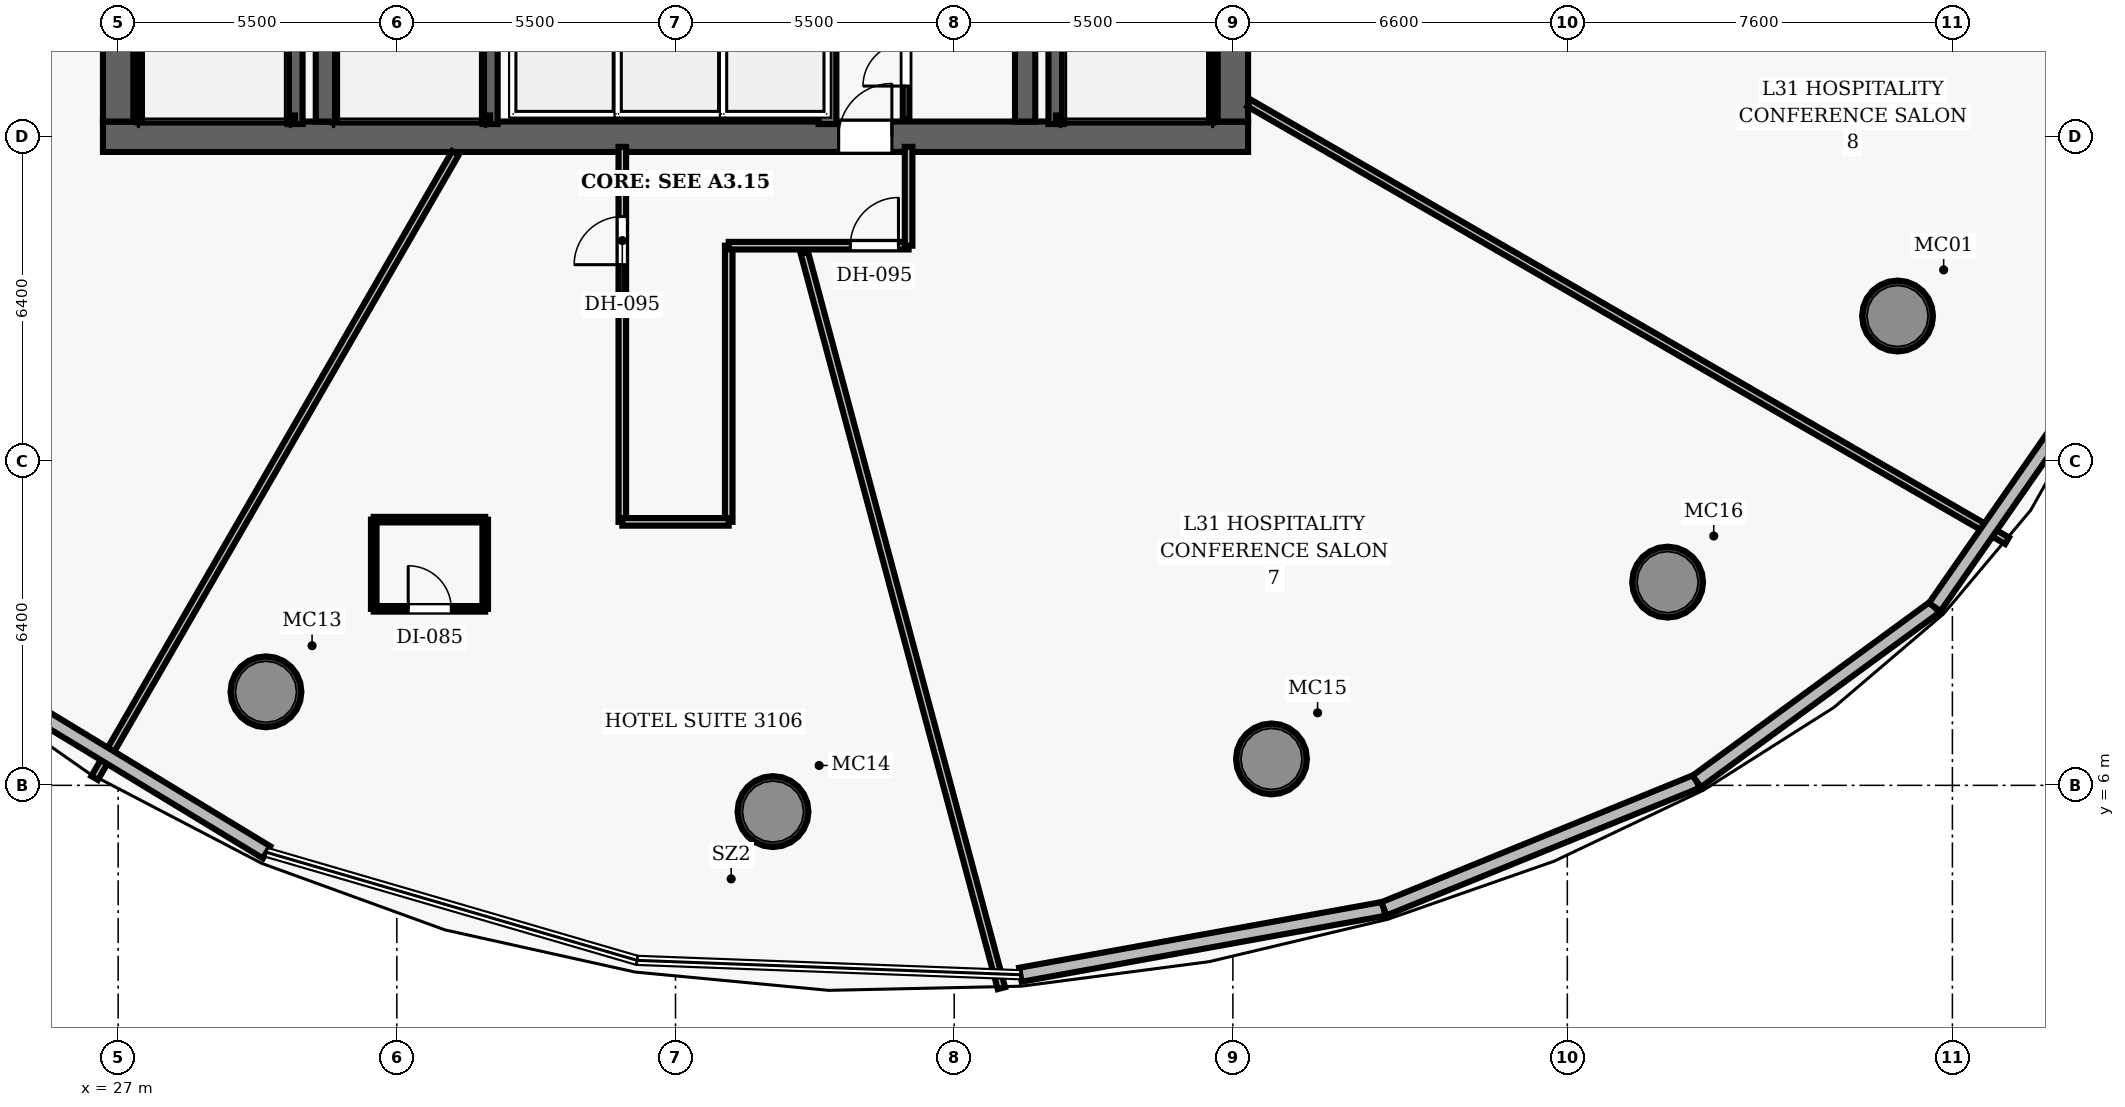
"""IFC4 building model, lengths in metres.
Left out: names, types, materials, properties, quantities, classifications, styles, units other than length and angle.
Written with IfcOpenShell. Run it as: python <this file> out.ifc"""

import sys

from ifc_helpers import new_model, si_unit, direction, frame, frame_2d, origin, origin_2d, place, context, subcontext, project, spatial, rectangle, hollow_circle, extrude, element, fill, save


model = new_model("IFC4")
c1 = context("Model", 3, precision=1e-05, world=origin(), true_north=direction((0.0, 1.0)))
c2 = subcontext(c1, "Body", "Model", "MODEL_VIEW")
j1 = project(units=[si_unit("LENGTHUNIT", "METRE"), si_unit("PLANEANGLEUNIT", "RADIAN")], contexts=[c1])
p1 = place(None, origin())
s1 = spatial("IfcSite", under=j1, at=p1, CompositionType="ELEMENT")
p2 = place(p1, origin())
s2 = spatial("IfcBuilding", under=s1, at=p2, CompositionType="ELEMENT")
p3 = place(p2, frame((0.0, 0.0, 127.3)))
s3 = spatial("IfcBuildingStorey", under=s2, at=p3, CompositionType="ELEMENT", Elevation=127.3)
p4 = place(p3, frame((26.7, 18.8, 0.0), z_axis=(0.0, 0.0, 1.0), x_axis=(1.0, 0.0, 0.0)))
e1 = element("IfcWall", 1, at=p4, inside=s3, PredefinedType="SHEAR", context=c2, shape_type="SweptSolid", body=[
    extrude(rectangle(XDim=22.6, YDim=0.6, at=frame_2d((11.3, 0.0))), origin(), (0.0, 0.0, 1.0), 3.5),
])
p5 = place(p4, frame((14.52, 0.0, 0.0)))
e2 = element("IfcOpeningElement", 2, at=p5, cuts=e1, PredefinedType="OPENING", context=c2, shape_type="SweptSolid", body=[
    extrude(rectangle(XDim=1.05, YDim=2.15, at=frame_2d((0.525, 1.075))), frame((0.0, 0.31, 0.0), z_axis=(0.0, -1.0, 0.0), x_axis=(1.0, 0.0, 0.0)), (0.0, 0.0, 1.0), 0.62),
])
p6 = place(p3, frame((27.0, 19.1, 0.0), z_axis=(0.0, 0.0, 1.0), x_axis=(0.0, 1.0, 0.0)))
e3 = element("IfcWall", 3, at=p6, inside=s3, PredefinedType="SHEAR", context=c2, shape_type="SweptSolid", body=[
    extrude(rectangle(XDim=13.8, YDim=0.6, at=frame_2d((6.9, 0.0))), origin(), (0.0, 0.0, 1.0), 3.5),
])
p7 = place(p6, frame((8.2, 0.0, 0.0)))
e4 = element("IfcOpeningElement", 4, at=p7, cuts=e3, PredefinedType="OPENING", context=c2, shape_type="SweptSolid", body=[
    extrude(rectangle(XDim=1.05, YDim=2.15, at=frame_2d((0.525, 1.075))), frame((0.0, 0.31, 0.0), z_axis=(0.0, -1.0, 0.0), x_axis=(1.0, 0.0, 0.0)), (0.0, 0.0, 1.0), 0.62),
])
p8 = place(p3, frame((49.0, 19.1, 0.0), z_axis=(0.0, 0.0, 1.0), x_axis=(0.0, 1.0, 0.0)))
e5 = element("IfcWall", 5, at=p8, inside=s3, PredefinedType="SHEAR", context=c2, shape_type="SweptSolid", body=[
    extrude(rectangle(XDim=13.8, YDim=0.6, at=frame_2d((6.9, 0.0))), origin(), (0.0, 0.0, 1.0), 3.5),
])
p9 = place(p8, frame((8.2, 0.0, 0.0)))
e6 = element("IfcOpeningElement", 6, at=p9, cuts=e5, PredefinedType="OPENING", context=c2, shape_type="SweptSolid", body=[
    extrude(rectangle(XDim=1.05, YDim=2.15, at=frame_2d((0.525, 1.075))), frame((0.0, 0.31, 0.0), z_axis=(0.0, -1.0, 0.0), x_axis=(1.0, 0.0, 0.0)), (0.0, 0.0, 1.0), 0.62),
])
for number, where, z_axis, x_axis in (
    (7, (31.1, 19.1, 0.0), (0.0, 0.0, 1.0), (0.0, 1.0, 0.0)),
    (8, (44.9, 19.1, 0.0), (0.0, 0.0, 1.0), (0.0, 1.0, 0.0)),
):
    element("IfcWall", number, at=place(p3, frame(where, z_axis=z_axis, x_axis=x_axis)), inside=s3, PredefinedType="SHEAR", context=c2, shape_type="SweptSolid", body=[
        extrude(rectangle(XDim=13.8, YDim=0.4, at=frame_2d((6.9, 0.0))), origin(), (0.0, 0.0, 1.0), 3.5),
    ])
for number, where, z_axis, x_axis in (
    (9, (62.118, 15.262, 0.0), (0.0, 0.0, 1.0), (1.0, 0.0, 0.0)),
    (10, (29.917, 7.846, 0.0), (0.0, 0.0, 1.0), (1.0, 0.0, 0.0)),
    (11, (39.924, 5.483, 0.0), (0.0, 0.0, 1.0), (1.0, 0.0, 0.0)),
    (12, (49.762, 6.521, 0.0), (0.0, 0.0, 1.0), (1.0, 0.0, 0.0)),
    (13, (57.58, 10.011, 0.0), (0.0, 0.0, 1.0), (1.0, 0.0, 0.0)),
):
    element("IfcColumn", number, at=place(p3, frame(where, z_axis=z_axis, x_axis=x_axis)), inside=s3, PredefinedType="COLUMN", context=c2, shape_type="SweptSolid", body=[
        extrude(hollow_circle(Radius=0.7, WallThickness=0.055, at=origin_2d()), origin(), (0.0, 0.0, 1.0), 3.5),
    ])
p10 = place(p3, frame((30.49, 19.05, 0.0), z_axis=(0.0, 0.0, 1.0), x_axis=(0.0, 1.0, 0.0)))
e14 = element("IfcWall", 14, at=p10, inside=s3, PredefinedType="SHEAR", context=c2, shape_type="SweptSolid", body=[
    extrude(rectangle(XDim=7.5, YDim=0.3, at=frame_2d((3.75, 0.0))), origin(), (0.0, 0.0, 1.0), 3.5),
])
p11 = place(p3, frame((27.395, 19.1, 0.0), z_axis=(0.0, 0.0, 1.0), x_axis=(0.0, 1.0, 0.0)))
e15 = element("IfcWall", 15, at=p11, inside=s3, PredefinedType="SHEAR", context=c2, shape_type="SweptSolid", body=[
    extrude(rectangle(XDim=7.45, YDim=0.12, at=frame_2d((3.725, 0.0))), origin(), (0.0, 0.0, 1.0), 3.5),
])
p12 = place(p3, frame((27.395, 19.16, 0.0), z_axis=(0.0, 0.0, 1.0), x_axis=(1.0, 0.0, 0.0)))
e16 = element("IfcWall", 16, at=p12, inside=s3, PredefinedType="SHEAR", context=c2, shape_type="SweptSolid", body=[
    extrude(rectangle(XDim=3.095, YDim=0.12, at=frame_2d((1.547, 0.0))), origin(), (0.0, 0.0, 1.0), 3.5),
])
p13 = place(p3, frame((45.51, 19.05, 0.0), z_axis=(0.0, 0.0, 1.0), x_axis=(0.0, 1.0, 0.0)))
e17 = element("IfcWall", 17, at=p13, inside=s3, PredefinedType="SHEAR", context=c2, shape_type="SweptSolid", body=[
    extrude(rectangle(XDim=7.5, YDim=0.3, at=frame_2d((3.75, 0.0))), origin(), (0.0, 0.0, 1.0), 3.5),
])
p14 = place(p3, frame((48.605, 19.1, 0.0), z_axis=(0.0, 0.0, 1.0), x_axis=(0.0, 1.0, 0.0)))
e18 = element("IfcWall", 18, at=p14, inside=s3, PredefinedType="SHEAR", context=c2, shape_type="SweptSolid", body=[
    extrude(rectangle(XDim=7.45, YDim=0.12, at=frame_2d((3.725, 0.0))), origin(), (0.0, 0.0, 1.0), 3.5),
])
p15 = place(p3, frame((45.51, 19.16, 0.0), z_axis=(0.0, 0.0, 1.0), x_axis=(1.0, 0.0, 0.0)))
e19 = element("IfcWall", 19, at=p15, inside=s3, PredefinedType="SHEAR", context=c2, shape_type="SweptSolid", body=[
    extrude(rectangle(XDim=3.095, YDim=0.12, at=frame_2d((1.547, 0.0))), origin(), (0.0, 0.0, 1.0), 3.5),
])
p16 = place(p3, frame((34.34, 19.05, 0.0), z_axis=(0.0, 0.0, 1.0), x_axis=(0.0, 1.0, 0.0)))
e20 = element("IfcWall", 20, at=p16, inside=s3, PredefinedType="SHEAR", context=c2, shape_type="SweptSolid", body=[
    extrude(rectangle(XDim=7.5, YDim=0.3, at=frame_2d((3.75, 0.0))), origin(), (0.0, 0.0, 1.0), 3.5),
])
p17 = place(p3, frame((31.3, 19.16, 0.0), z_axis=(0.0, 0.0, 1.0), x_axis=(1.0, 0.0, 0.0)))
e21 = element("IfcWall", 21, at=p17, inside=s3, PredefinedType="SHEAR", context=c2, shape_type="SweptSolid", body=[
    extrude(rectangle(XDim=3.04, YDim=0.12, at=frame_2d((1.52, 0.0))), origin(), (0.0, 0.0, 1.0), 3.5),
])
p18 = place(p3, frame((41.0, 19.05, 0.0), z_axis=(0.0, 0.0, 1.0), x_axis=(0.0, 1.0, 0.0)))
e22 = element("IfcWall", 22, at=p18, inside=s3, PredefinedType="SHEAR", context=c2, shape_type="SweptSolid", body=[
    extrude(rectangle(XDim=2.08, YDim=0.35, at=frame_2d((1.04, 0.0))), origin(), (0.0, 0.0, 1.0), 2.675),
])
p19 = place(p3, frame((42.55, 19.15, 0.0), z_axis=(0.0, 0.0, 1.0), x_axis=(0.0, 1.0, 0.0)))
e23 = element("IfcWall", 23, at=p19, inside=s3, PredefinedType="PARTITIONING", context=c2, shape_type="SweptSolid", body=[
    extrude(rectangle(XDim=2.75, YDim=0.13, at=frame_2d((1.375, 0.0))), origin(), (0.0, 0.0, 1.0), 2.675),
])
p20 = place(p19, frame((0.65, 0.0, 0.0)))
e24 = element("IfcOpeningElement", 24, at=p20, cuts=e23, PredefinedType="OPENING", context=c2, shape_type="SweptSolid", body=[
    extrude(rectangle(XDim=0.85, YDim=2.1, at=frame_2d((0.425, 1.05))), frame((0.0, 0.075, 0.0), z_axis=(0.0, -1.0, 0.0), x_axis=(1.0, 0.0, 0.0)), (0.0, 0.0, 1.0), 0.15),
])
p21 = place(p3, frame((36.95, 11.2, 0.0), z_axis=(0.0, 0.0, 1.0), x_axis=(0.0, 1.0, 0.0)))
e25 = element("IfcWall", 25, at=p21, inside=s3, PredefinedType="PARTITIONING", context=c2, shape_type="SweptSolid", body=[
    extrude(rectangle(XDim=7.4, YDim=0.15, at=frame_2d((3.7, 0.0))), origin(), (0.0, 0.0, 1.0), 2.675),
])
p22 = place(p21, frame((5.075, 0.0, 0.0)))
e26 = element("IfcOpeningElement", 26, at=p22, cuts=e25, PredefinedType="OPENING", context=c2, shape_type="SweptSolid", body=[
    extrude(rectangle(XDim=0.95, YDim=2.15, at=frame_2d((0.475, 1.075))), frame((0.0, 0.085, 0.0), z_axis=(0.0, -1.0, 0.0), x_axis=(1.0, 0.0, 0.0)), (0.0, 0.0, 1.0), 0.17),
])
p23 = place(p3, frame((39.05, 11.2, 0.0), z_axis=(0.0, 0.0, 1.0), x_axis=(0.0, 1.0, 0.0)))
e27 = element("IfcWall", 27, at=p23, inside=s3, PredefinedType="PARTITIONING", context=c2, shape_type="SweptSolid", body=[
    extrude(rectangle(XDim=5.45, YDim=0.15, at=frame_2d((2.725, 0.0))), origin(), (0.0, 0.0, 1.0), 2.675),
])
p24 = place(p3, frame((39.05, 16.65, 0.0), z_axis=(0.0, 0.0, 1.0), x_axis=(1.0, 0.0, 0.0)))
e28 = element("IfcWall", 28, at=p24, inside=s3, PredefinedType="PARTITIONING", context=c2, shape_type="SweptSolid", body=[
    extrude(rectangle(XDim=3.55, YDim=0.15, at=frame_2d((1.775, 0.0))), origin(), (0.0, 0.0, 1.0), 2.675),
])
p25 = place(p24, frame((2.4, 0.0, 0.0)))
e29 = element("IfcOpeningElement", 29, at=p25, cuts=e28, PredefinedType="OPENING", context=c2, shape_type="SweptSolid", body=[
    extrude(rectangle(XDim=0.95, YDim=2.15, at=frame_2d((0.475, 1.075))), frame((0.0, 0.085, 0.0), z_axis=(0.0, -1.0, 0.0), x_axis=(1.0, 0.0, 0.0)), (0.0, 0.0, 1.0), 0.17),
])
p26 = place(p3, frame((42.6, 16.65, 0.0), z_axis=(0.0, 0.0, 1.0), x_axis=(0.0, 1.0, 0.0)))
e30 = element("IfcWall", 30, at=p26, inside=s3, PredefinedType="PARTITIONING", context=c2, shape_type="SweptSolid", body=[
    extrude(rectangle(XDim=1.95, YDim=0.15, at=frame_2d((0.975, 0.0))), origin(), (0.0, 0.0, 1.0), 2.675),
])
p27 = place(p3, frame((36.95, 11.2, 0.0), z_axis=(0.0, 0.0, 1.0), x_axis=(1.0, 0.0, 0.0)))
e31 = element("IfcWall", 31, at=p27, inside=s3, PredefinedType="PARTITIONING", context=c2, shape_type="SweptSolid", body=[
    extrude(rectangle(XDim=2.1, YDim=0.15, at=frame_2d((1.05, 0.0))), origin(), (0.0, 0.0, 1.0), 2.675),
])
p28 = place(p3, frame((26.68, 22.967, 0.0), z_axis=(0.0, 0.0, 1.0), x_axis=(-0.965923864026, -0.258826368257, 0.0)))
e32 = element("IfcWall", 32, at=p28, inside=s3, PredefinedType="PARTITIONING", context=c2, shape_type="SweptSolid", body=[
    extrude(rectangle(XDim=12.886, YDim=0.15, at=frame_2d((6.443, 0.0))), origin(), (0.0, 0.0, 1.0), 2.675),
])
p29 = place(p3, frame((33.658, 18.48, 0.0), z_axis=(0.0, 0.0, 1.0), x_axis=(-0.500002865972, -0.866023749108, 0.0)))
e33 = element("IfcWall", 33, at=p29, inside=s3, PredefinedType="PARTITIONING", context=c2, shape_type="SweptSolid", body=[
    extrude(rectangle(XDim=14.244, YDim=0.15, at=frame_2d((7.122, 0.0))), origin(), (0.0, 0.0, 1.0), 2.675),
])
p30 = place(p3, frame((40.543, 16.51, 0.0), z_axis=(0.0, 0.0, 1.0), x_axis=(0.258819472716, -0.96592571171, 0.0)))
e34 = element("IfcWall", 34, at=p30, inside=s3, PredefinedType="PARTITIONING", context=c2, shape_type="SweptSolid", body=[
    extrude(rectangle(XDim=15.025, YDim=0.15, at=frame_2d((7.512, 0.0))), origin(), (0.0, 0.0, 1.0), 2.675),
])
p31 = place(p3, frame((49.32, 19.464, 0.0), z_axis=(0.0, 0.0, 1.0), x_axis=(0.866026939975, -0.499997339231, 0.0)))
e35 = element("IfcWall", 35, at=p31, inside=s3, PredefinedType="PARTITIONING", context=c2, shape_type="SweptSolid", body=[
    extrude(rectangle(XDim=17.272, YDim=0.15, at=frame_2d((8.636, 0.0))), origin(), (0.0, 0.0, 1.0), 2.675),
])
p32 = place(p3, frame((32.044, 9.483, 0.0), z_axis=(0.0, 0.0, 1.0), x_axis=(1.0, 0.0, 0.0)))
e36 = element("IfcWall", 36, at=p32, inside=s3, PredefinedType="PARTITIONING", context=c2, shape_type="SweptSolid", body=[
    extrude(rectangle(XDim=2.2, YDim=0.11, at=frame_2d((1.1, 0.0))), origin(), (0.0, 0.0, 1.0), 2.675),
])
p33 = place(p32, frame((0.68, 0.0, 0.0)))
e37 = element("IfcOpeningElement", 37, at=p33, cuts=e36, PredefinedType="OPENING", context=c2, shape_type="SweptSolid", body=[
    extrude(rectangle(XDim=0.85, YDim=2.1, at=frame_2d((0.425, 1.05))), frame((0.0, 0.065, 0.0), z_axis=(0.0, -1.0, 0.0), x_axis=(1.0, 0.0, 0.0)), (0.0, 0.0, 1.0), 0.13),
])
p34 = place(p3, frame((32.044, 11.243, 0.0), z_axis=(0.0, 0.0, 1.0), x_axis=(1.0, 0.0, 0.0)))
e38 = element("IfcWall", 38, at=p34, inside=s3, PredefinedType="PARTITIONING", context=c2, shape_type="SweptSolid", body=[
    extrude(rectangle(XDim=2.2, YDim=0.11, at=frame_2d((1.1, 0.0))), origin(), (0.0, 0.0, 1.0), 2.675),
])
for number, where, z_axis, x_axis in (
    (39, (32.044, 9.483, 0.0), (0.0, 0.0, 1.0), (0.0, 1.0, 0.0)),
    (40, (34.244, 9.483, 0.0), (0.0, 0.0, 1.0), (0.0, 1.0, 0.0)),
):
    element("IfcWall", number, at=place(p3, frame(where, z_axis=z_axis, x_axis=x_axis)), inside=s3, PredefinedType="PARTITIONING", context=c2, shape_type="SweptSolid", body=[
        extrude(rectangle(XDim=1.76, YDim=0.11, at=frame_2d((0.88, 0.0))), origin(), (0.0, 0.0, 1.0), 2.675),
    ])
p35 = place(p3, frame((29.929, 4.678, 0.0), z_axis=(0.0, 0.0, 1.0), x_axis=(-0.854928651423, 0.518745603332, 0.0)))
e41 = element("IfcWall", 41, at=p35, inside=s3, PredefinedType="SOLIDWALL", context=c2, shape_type="SweptSolid", body=[
    extrude(rectangle(XDim=7.617, YDim=0.28, at=frame_2d((3.809, 0.0))), origin(), (0.0, 0.0, 1.0), 3.26),
])
p36 = place(p3, frame((51.981, 3.563, 0.0), z_axis=(0.0, 0.0, 1.0), x_axis=(-0.983960849794, -0.1783845455, 0.0)))
e42 = element("IfcWall", 42, at=p36, inside=s3, PredefinedType="SOLIDWALL", context=c2, shape_type="SweptSolid", body=[
    extrude(rectangle(XDim=7.292, YDim=0.28, at=frame_2d((3.646, 0.0))), origin(), (0.0, 0.0, 1.0), 3.26),
])
p37 = place(p3, frame((58.154, 6.078, 0.0), z_axis=(0.0, 0.0, 1.0), x_axis=(-0.92611131991, -0.37725034544, 0.0)))
e43 = element("IfcWall", 43, at=p37, inside=s3, PredefinedType="SOLIDWALL", context=c2, shape_type="SweptSolid", body=[
    extrude(rectangle(XDim=6.665, YDim=0.28, at=frame_2d((3.333, 0.0))), origin(), (0.0, 0.0, 1.0), 3.26),
])
p38 = place(p3, frame((62.852, 9.517, 0.0), z_axis=(0.0, 0.0, 1.0), x_axis=(-0.80688994243, -0.590701803625, 0.0)))
e44 = element("IfcWall", 44, at=p38, inside=s3, PredefinedType="SOLIDWALL", context=c2, shape_type="SweptSolid", body=[
    extrude(rectangle(XDim=5.823, YDim=0.28, at=frame_2d((2.911, 0.0))), origin(), (0.0, 0.0, 1.0), 3.26),
])
p39 = place(p3, frame((65.807, 13.765, 0.0), z_axis=(0.0, 0.0, 1.0), x_axis=(-0.571097665785, -0.820882120731, 0.0)))
e45 = element("IfcWall", 45, at=p39, inside=s3, PredefinedType="SOLIDWALL", context=c2, shape_type="SweptSolid", body=[
    extrude(rectangle(XDim=5.174, YDim=0.28, at=frame_2d((2.587, 0.0))), origin(), (0.0, 0.0, 1.0), 3.26),
])
p40 = place(p5, origin())
e46 = element("IfcDoor", 46, at=p40, inside=s3, OperationType="SINGLE_SWING_RIGHT", PredefinedType="DOOR", context=c2, shape_type="SweptSolid", body=[
    extrude(rectangle(XDim=1.05, YDim=2.15, at=frame_2d((0.525, 1.075))), frame((0.0, 0.025, 0.0), z_axis=(0.0, -1.0, 0.0), x_axis=(1.0, 0.0, 0.0)), (0.0, 0.0, 1.0), 0.05),
])
fill(e2, e46)
p41 = place(p20, origin())
e47 = element("IfcDoor", 47, at=p41, inside=s3, OperationType="SINGLE_SWING_LEFT", PredefinedType="DOOR", context=c2, shape_type="SweptSolid", body=[
    extrude(rectangle(XDim=0.85, YDim=2.1, at=frame_2d((0.425, 1.05))), frame((0.0, 0.025, 0.0), z_axis=(0.0, -1.0, 0.0), x_axis=(1.0, 0.0, 0.0)), (0.0, 0.0, 1.0), 0.05),
])
fill(e24, e47)
p42 = place(p22, origin())
e48 = element("IfcDoor", 48, at=p42, inside=s3, OperationType="SINGLE_SWING_LEFT", PredefinedType="DOOR", context=c2, shape_type="SweptSolid", body=[
    extrude(rectangle(XDim=0.95, YDim=2.15, at=frame_2d((0.475, 1.075))), frame((0.0, 0.025, 0.0), z_axis=(0.0, -1.0, 0.0), x_axis=(1.0, 0.0, 0.0)), (0.0, 0.0, 1.0), 0.05),
])
fill(e26, e48)
p43 = place(p33, origin())
e49 = element("IfcDoor", 49, at=p43, inside=s3, OperationType="SINGLE_SWING_LEFT", PredefinedType="DOOR", context=c2, shape_type="SweptSolid", body=[
    extrude(rectangle(XDim=0.85, YDim=2.1, at=frame_2d((0.425, 1.05))), frame((0.0, 0.025, 0.0), z_axis=(0.0, -1.0, 0.0), x_axis=(1.0, 0.0, 0.0)), (0.0, 0.0, 1.0), 0.05),
])
fill(e37, e49)
p44 = place(p25, origin())
e50 = element("IfcDoor", 50, at=p44, inside=s3, OperationType="SINGLE_SWING_RIGHT", PredefinedType="DOOR", context=c2, shape_type="SweptSolid", body=[
    extrude(rectangle(XDim=0.95, YDim=2.15, at=frame_2d((0.475, 1.075))), frame((0.0, 0.025, 0.0), z_axis=(0.0, -1.0, 0.0), x_axis=(1.0, 0.0, 0.0)), (0.0, 0.0, 1.0), 0.05),
])
fill(e29, e50)
save(model, sys.argv[1])
